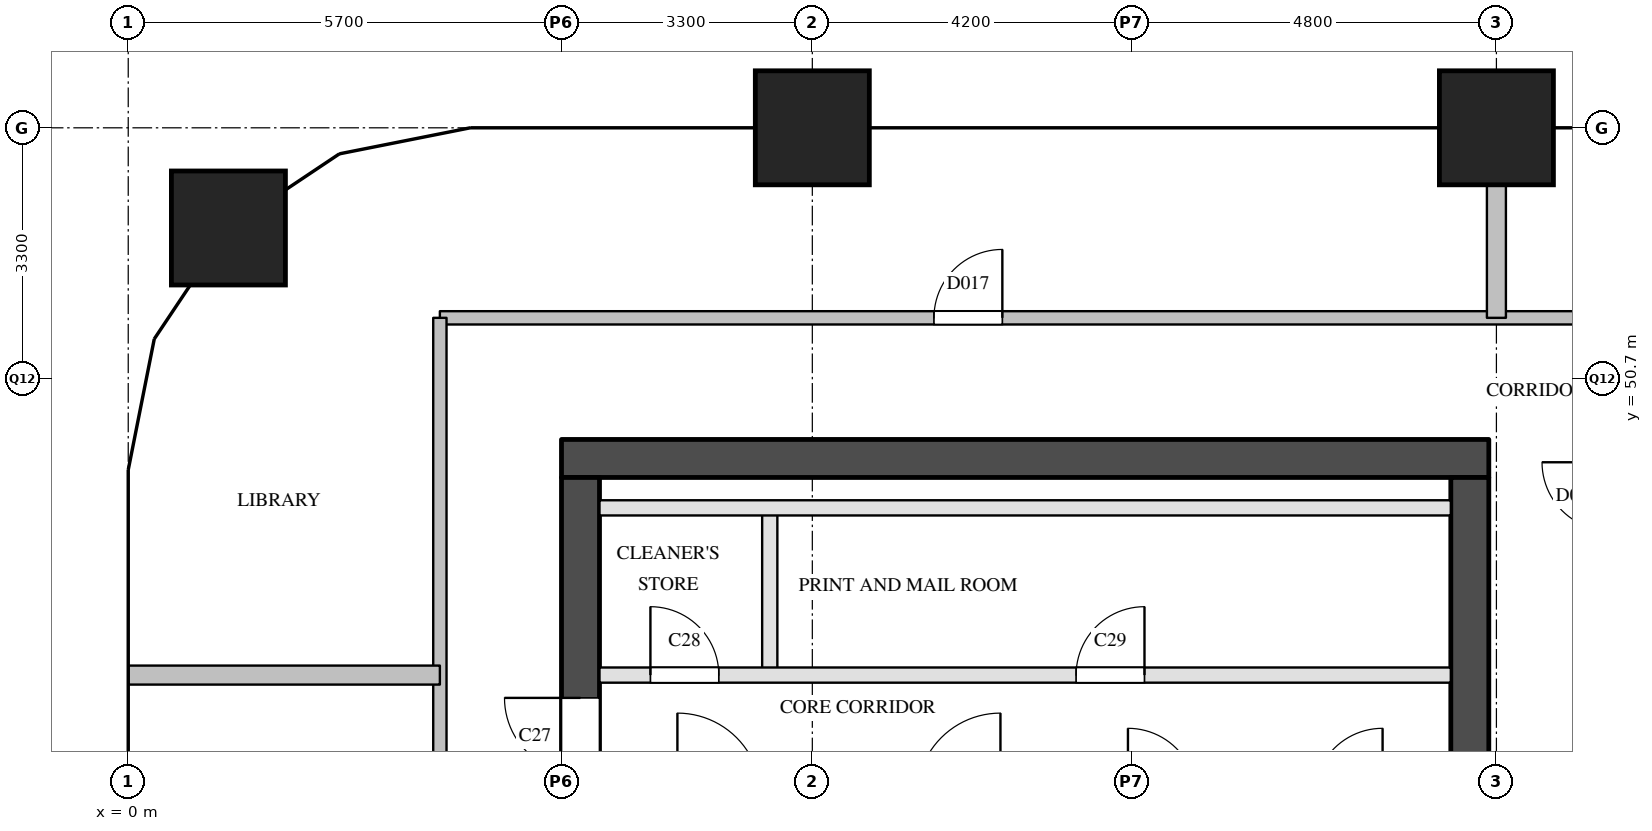
"""IFC4 building model, lengths in metres.
Left out: names, types, materials, properties, quantities, classifications, styles, units other than length and angle.
Written with IfcOpenShell. Run it as: python <this file> out.ifc"""

import sys

from ifc_helpers import new_model, si_unit, direction, frame, frame_2d, origin, origin_2d, place, context, subcontext, project, spatial, rectangle, extrude, element, fill, save


model = new_model("IFC4")
c1 = context("Model", 3, precision=1e-05, world=origin(), true_north=direction((0.0, 1.0)))
c2 = subcontext(c1, "Body", "Model", "MODEL_VIEW")
j1 = project(units=[si_unit("LENGTHUNIT", "METRE"), si_unit("PLANEANGLEUNIT", "RADIAN")], contexts=[c1])
p1 = place(None, origin())
s1 = spatial("IfcSite", under=j1, at=p1, CompositionType="ELEMENT")
p2 = place(p1, origin())
s2 = spatial("IfcBuilding", under=s1, at=p2, CompositionType="ELEMENT")
p3 = place(p2, frame((0.0, 0.0, 166.1)))
s3 = spatial("IfcBuildingStorey", under=s2, at=p3, CompositionType="ELEMENT", Elevation=166.1)
for number, where, z_axis, x_axis in (
    (1, (1.318, 52.682, 0.0), (0.0, 0.0, 1.0), (1.0, 0.0, 0.0)),
    (2, (9.0, 54.0, 0.0), (0.0, 0.0, 1.0), (1.0, 0.0, 0.0)),
    (3, (18.0, 54.0, 0.0), (0.0, 0.0, 1.0), (1.0, 0.0, 0.0)),
):
    element("IfcColumn", number, at=place(p3, frame(where, z_axis=z_axis, x_axis=x_axis)), inside=s3, PredefinedType="COLUMN", context=c2, shape_type="SweptSolid", body=[
        extrude(rectangle(XDim=1.5, YDim=1.5, at=origin_2d()), origin(), (0.0, 0.0, 1.0), 3.9),
    ])
p4 = place(p3, frame((5.7, 49.65, 0.0), z_axis=(0.0, 0.0, 1.0), x_axis=(1.0, 0.0, 0.0)))
e4 = element("IfcWall", 4, at=p4, inside=s3, PredefinedType="SHEAR", context=c2, shape_type="SweptSolid", body=[
    extrude(rectangle(XDim=12.2, YDim=0.5, at=frame_2d((6.1, 0.0))), origin(), (0.0, 0.0, 1.0), 3.6),
])
p5 = place(p3, frame((5.95, 29.1, 0.0), z_axis=(0.0, 0.0, 1.0), x_axis=(0.0, 1.0, 0.0)))
e5 = element("IfcWall", 5, at=p5, inside=s3, PredefinedType="SHEAR", context=c2, shape_type="SweptSolid", body=[
    extrude(rectangle(XDim=20.3, YDim=0.5, at=frame_2d((10.15, 0.0))), origin(), (0.0, 0.0, 1.0), 3.6),
])
p6 = place(p5, frame((3.45, 0.0, 0.0)))
e6 = element("IfcOpeningElement", 6, at=p6, cuts=e5, PredefinedType="OPENING", context=c2, shape_type="SweptSolid", body=[
    extrude(rectangle(XDim=1.0, YDim=2.1, at=frame_2d((0.5, 1.05))), frame((0.0, 0.26, 0.0), z_axis=(0.0, -1.0, 0.0), x_axis=(1.0, 0.0, 0.0)), (0.0, 0.0, 1.0), 0.52),
])
p7 = place(p5, frame((16.4, 0.0, 0.0)))
e7 = element("IfcOpeningElement", 7, at=p7, cuts=e5, PredefinedType="OPENING", context=c2, shape_type="SweptSolid", body=[
    extrude(rectangle(XDim=1.0, YDim=2.1, at=frame_2d((0.5, 1.05))), frame((0.0, 0.26, 0.0), z_axis=(0.0, -1.0, 0.0), x_axis=(1.0, 0.0, 0.0)), (0.0, 0.0, 1.0), 0.52),
])
p8 = place(p3, frame((17.65, 29.1, 0.0), z_axis=(0.0, 0.0, 1.0), x_axis=(0.0, 1.0, 0.0)))
e8 = element("IfcWall", 8, at=p8, inside=s3, PredefinedType="SHEAR", context=c2, shape_type="SweptSolid", body=[
    extrude(rectangle(XDim=20.3, YDim=0.5, at=frame_2d((10.15, 0.0))), origin(), (0.0, 0.0, 1.0), 3.6),
])
p9 = place(p8, frame((1.25, 0.0, 0.0)))
e9 = element("IfcOpeningElement", 9, at=p9, cuts=e8, PredefinedType="OPENING", context=c2, shape_type="SweptSolid", body=[
    extrude(rectangle(XDim=0.7, YDim=2.1, at=frame_2d((0.35, 1.05))), frame((0.0, 0.26, 0.0), z_axis=(0.0, -1.0, 0.0), x_axis=(1.0, 0.0, 0.0)), (0.0, 0.0, 1.0), 0.52),
])
p10 = place(p8, frame((7.05, 0.0, 0.0)))
e10 = element("IfcOpeningElement", 10, at=p10, cuts=e8, PredefinedType="OPENING", context=c2, shape_type="SweptSolid", body=[
    extrude(rectangle(XDim=0.7, YDim=2.1, at=frame_2d((0.35, 1.05))), frame((0.0, 0.26, 0.0), z_axis=(0.0, -1.0, 0.0), x_axis=(1.0, 0.0, 0.0)), (0.0, 0.0, 1.0), 0.52),
])
p11 = place(p8, frame((3.6, 0.0, 0.0)))
e11 = element("IfcOpeningElement", 11, at=p11, cuts=e8, PredefinedType="OPENING", context=c2, shape_type="SweptSolid", body=[
    extrude(rectangle(XDim=1.8, YDim=2.1, at=frame_2d((0.9, 1.05))), frame((0.0, 0.26, 0.0), z_axis=(0.0, -1.0, 0.0), x_axis=(1.0, 0.0, 0.0)), (0.0, 0.0, 1.0), 0.52),
])
p12 = place(p3, frame((8.44, 46.8, 0.0), z_axis=(0.0, 0.0, 1.0), x_axis=(0.0, 1.0, 0.0)))
e12 = element("IfcWall", 12, at=p12, inside=s3, PredefinedType="PARTITIONING", context=c2, shape_type="SweptSolid", body=[
    extrude(rectangle(XDim=2.2, YDim=0.2, at=frame_2d((1.1, 0.0))), origin(), (0.0, 0.0, 1.0), 3.6),
])
p13 = place(p3, frame((6.2, 46.8, 0.0), z_axis=(0.0, 0.0, 1.0), x_axis=(1.0, 0.0, 0.0)))
e13 = element("IfcWall", 13, at=p13, inside=s3, PredefinedType="PARTITIONING", context=c2, shape_type="SweptSolid", body=[
    extrude(rectangle(XDim=11.2, YDim=0.2, at=frame_2d((5.6, 0.0))), origin(), (0.0, 0.0, 1.0), 3.6),
])
p14 = place(p13, frame((0.67, 0.0, 0.0)))
e14 = element("IfcOpeningElement", 14, at=p14, cuts=e13, PredefinedType="OPENING", context=c2, shape_type="SweptSolid", body=[
    extrude(rectangle(XDim=0.9, YDim=2.1, at=frame_2d((0.45, 1.05))), frame((0.0, 0.11, 0.0), z_axis=(0.0, -1.0, 0.0), x_axis=(1.0, 0.0, 0.0)), (0.0, 0.0, 1.0), 0.22),
])
p15 = place(p13, frame((6.27, 0.0, 0.0)))
e15 = element("IfcOpeningElement", 15, at=p15, cuts=e13, PredefinedType="OPENING", context=c2, shape_type="SweptSolid", body=[
    extrude(rectangle(XDim=0.9, YDim=2.1, at=frame_2d((0.45, 1.05))), frame((0.0, 0.11, 0.0), z_axis=(0.0, -1.0, 0.0), x_axis=(1.0, 0.0, 0.0)), (0.0, 0.0, 1.0), 0.22),
])
p16 = place(p3, frame((6.2, 49.0, 0.0), z_axis=(0.0, 0.0, 1.0), x_axis=(1.0, 0.0, 0.0)))
e16 = element("IfcWall", 16, at=p16, inside=s3, PredefinedType="PARTITIONING", context=c2, shape_type="SweptSolid", body=[
    extrude(rectangle(XDim=11.2, YDim=0.2, at=frame_2d((5.6, 0.0))), origin(), (0.0, 0.0, 1.0), 3.6),
])
p17 = place(p3, frame((4.1, 51.5, 0.0), z_axis=(0.0, 0.0, 1.0), x_axis=(1.0, 0.0, 0.0)))
e17 = element("IfcWall", 17, at=p17, inside=s3, PredefinedType="PARTITIONING", context=c2, shape_type="SweptSolid", body=[
    extrude(rectangle(XDim=15.4, YDim=0.175, at=frame_2d((7.7, 0.0))), origin(), (0.0, 0.0, 1.0), 3.6),
])
p18 = place(p17, frame((6.5, 0.0, 0.0)))
e18 = element("IfcOpeningElement", 18, at=p18, cuts=e17, PredefinedType="OPENING", context=c2, shape_type="SweptSolid", body=[
    extrude(rectangle(XDim=0.9, YDim=2.1, at=frame_2d((0.45, 1.05))), frame((0.0, 0.097, 0.0), z_axis=(0.0, -1.0, 0.0), x_axis=(1.0, 0.0, 0.0)), (0.0, 0.0, 1.0), 0.195),
])
p19 = place(p3, frame((4.1, 28.5, 0.0), z_axis=(0.0, 0.0, 1.0), x_axis=(0.0, 1.0, 0.0)))
e19 = element("IfcWall", 19, at=p19, inside=s3, PredefinedType="PARTITIONING", context=c2, shape_type="SweptSolid", body=[
    extrude(rectangle(XDim=23.0, YDim=0.175, at=frame_2d((11.5, 0.0))), origin(), (0.0, 0.0, 1.0), 3.6),
])
p20 = place(p19, frame((3.3, 0.0, 0.0)))
e20 = element("IfcOpeningElement", 20, at=p20, cuts=e19, PredefinedType="OPENING", context=c2, shape_type="SweptSolid", body=[
    extrude(rectangle(XDim=0.9, YDim=2.1, at=frame_2d((0.45, 1.05))), frame((0.0, 0.097, 0.0), z_axis=(0.0, -1.0, 0.0), x_axis=(1.0, 0.0, 0.0)), (0.0, 0.0, 1.0), 0.195),
])
p21 = place(p19, frame((12.45, 0.0, 0.0)))
e21 = element("IfcOpeningElement", 21, at=p21, cuts=e19, PredefinedType="OPENING", context=c2, shape_type="SweptSolid", body=[
    extrude(rectangle(XDim=0.9, YDim=2.1, at=frame_2d((0.45, 1.05))), frame((0.0, 0.097, 0.0), z_axis=(0.0, -1.0, 0.0), x_axis=(1.0, 0.0, 0.0)), (0.0, 0.0, 1.0), 0.195),
])
p22 = place(p3, frame((0.0, 46.8, 0.0), z_axis=(0.0, 0.0, 1.0), x_axis=(1.0, 0.0, 0.0)))
e22 = element("IfcWall", 22, at=p22, inside=s3, PredefinedType="PARTITIONING", context=c2, shape_type="SweptSolid", body=[
    extrude(rectangle(XDim=4.1, YDim=0.25, at=frame_2d((2.05, 0.0))), origin(), (0.0, 0.0, 1.0), 2.6),
])
p23 = place(p3, frame((18.0, 51.5, 0.0), z_axis=(0.0, 0.0, 1.0), x_axis=(0.0, 1.0, 0.0)))
e23 = element("IfcWall", 23, at=p23, inside=s3, PredefinedType="PARTITIONING", context=c2, shape_type="SweptSolid", body=[
    extrude(rectangle(XDim=2.5, YDim=0.25, at=frame_2d((1.25, 0.0))), origin(), (0.0, 0.0, 1.0), 3.6),
])
p24 = place(p7, origin())
e24 = element("IfcDoor", 24, at=p24, inside=s3, OperationType="SINGLE_SWING_RIGHT", PredefinedType="DOOR", context=c2, shape_type="SweptSolid", body=[
    extrude(rectangle(XDim=1.0, YDim=2.1, at=frame_2d((0.5, 1.05))), frame((0.0, 0.025, 0.0), z_axis=(0.0, -1.0, 0.0), x_axis=(1.0, 0.0, 0.0)), (0.0, 0.0, 1.0), 0.05),
])
fill(e7, e24)
p25 = place(p14, origin())
e25 = element("IfcDoor", 25, at=p25, inside=s3, OperationType="SINGLE_SWING_LEFT", PredefinedType="DOOR", context=c2, shape_type="SweptSolid", body=[
    extrude(rectangle(XDim=0.9, YDim=2.1, at=frame_2d((0.45, 1.05))), frame((0.0, 0.025, 0.0), z_axis=(0.0, -1.0, 0.0), x_axis=(1.0, 0.0, 0.0)), (0.0, 0.0, 1.0), 0.05),
])
fill(e14, e25)
p26 = place(p15, origin())
e26 = element("IfcDoor", 26, at=p26, inside=s3, OperationType="SINGLE_SWING_RIGHT", PredefinedType="DOOR", context=c2, shape_type="SweptSolid", body=[
    extrude(rectangle(XDim=0.9, YDim=2.1, at=frame_2d((0.45, 1.05))), frame((0.0, 0.025, 0.0), z_axis=(0.0, -1.0, 0.0), x_axis=(1.0, 0.0, 0.0)), (0.0, 0.0, 1.0), 0.05),
])
fill(e15, e26)
p27 = place(p18, origin())
e27 = element("IfcDoor", 27, at=p27, inside=s3, OperationType="SINGLE_SWING_RIGHT", PredefinedType="DOOR", context=c2, shape_type="SweptSolid", body=[
    extrude(rectangle(XDim=0.9, YDim=2.1, at=frame_2d((0.45, 1.05))), frame((0.0, 0.025, 0.0), z_axis=(0.0, -1.0, 0.0), x_axis=(1.0, 0.0, 0.0)), (0.0, 0.0, 1.0), 0.05),
])
fill(e18, e27)
save(model, sys.argv[1])
